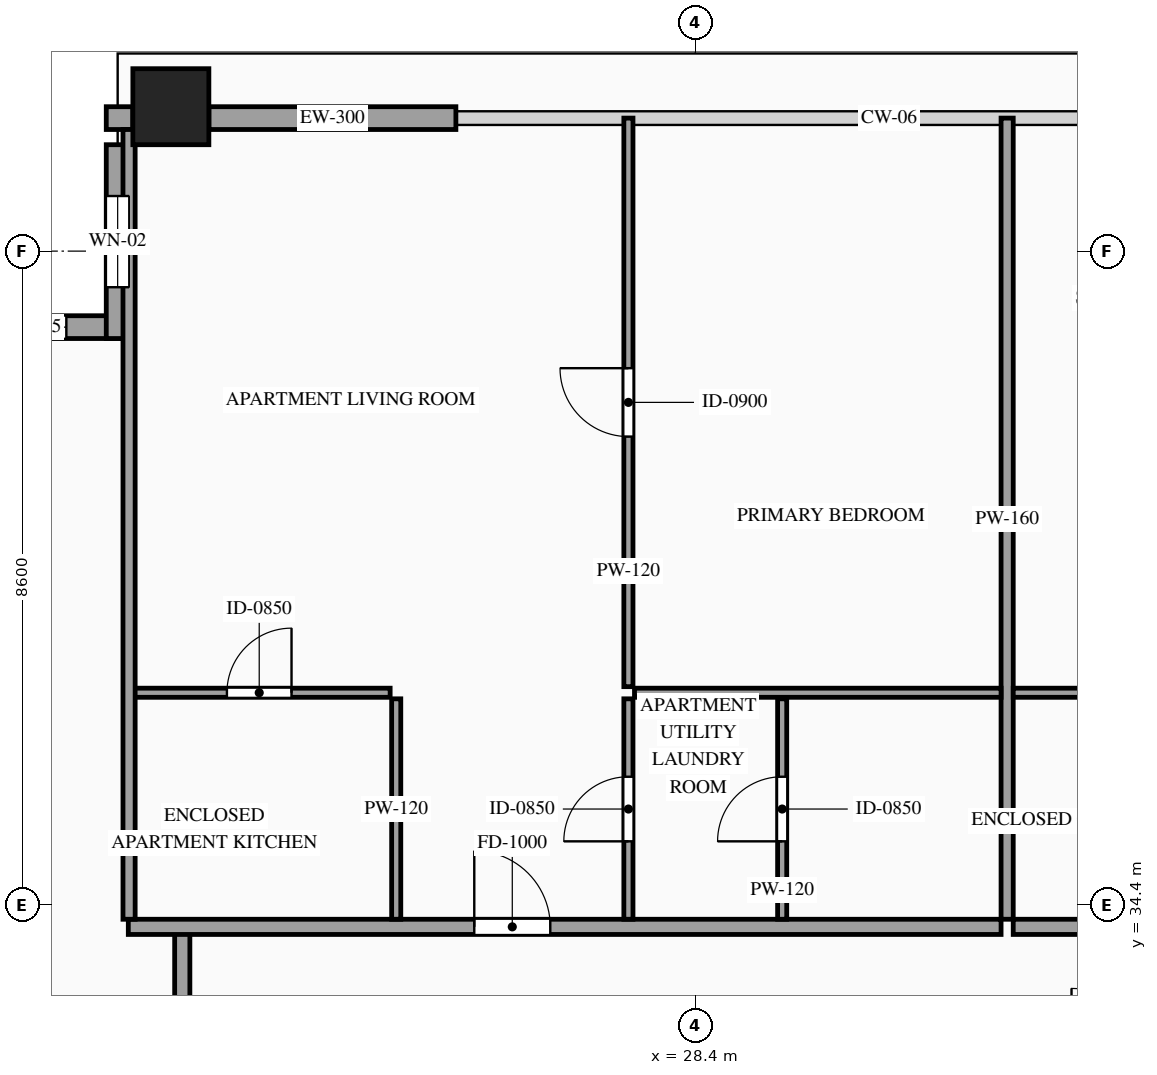
"""IFC4 building model, lengths in metres.
Left out: names, types, materials, properties, quantities, classifications, styles, units other than length and angle.
Written with IfcOpenShell. Run it as: python <this file> out.ifc"""

import sys

from ifc_helpers import new_model, si_unit, direction, frame, frame_2d, origin, origin_2d, place, context, subcontext, project, spatial, rectangle, hollow_rectangle, extrude, source, transform, mapped, element, fill, save


model = new_model("IFC4")
c1 = context("Model", 3, precision=1e-05, world=origin(), true_north=direction((0.0, 1.0)))
c2 = subcontext(c1, "Body", "Model", "MODEL_VIEW")
j1 = project(units=[si_unit("LENGTHUNIT", "METRE"), si_unit("PLANEANGLEUNIT", "RADIAN")], contexts=[c1])
p1 = place(None, origin())
s1 = spatial("IfcSite", under=j1, at=p1, CompositionType="ELEMENT")
p2 = place(p1, origin())
s2 = spatial("IfcBuilding", under=s1, at=p2, CompositionType="ELEMENT")
p3 = place(p2, frame((0.0, 0.0, 343.2)))
s3 = spatial("IfcBuildingStorey", under=s2, at=p3, CompositionType="ELEMENT", Elevation=343.2)
m1 = source(origin(), c2, "Body", "SweptSolid", [
    extrude(hollow_rectangle(XDim=1.0, YDim=1.0, WallThickness=0.048, at=origin_2d()), origin(), (0.0, 0.0, 1.0), 4.0),
])
p4 = place(p3, frame((21.5, 44.9, 0.0), z_axis=(0.0, 0.0, 1.0), x_axis=(1.0, 0.0, 0.0)))
e1 = element("IfcColumn", 1, at=p4, inside=s3, PredefinedType="COLUMN", context=c2, shape_type="MappedRepresentation", body=[
    mapped(m1, transform((0.0, 0.0, 0.0), scale=1.0)),
])
p5 = place(p3, frame((20.95, 42.0, 0.0), z_axis=(0.0, 0.0, 1.0), x_axis=(-1.0, 0.0, 0.0)))
e2 = element("IfcWall", 2, at=p5, inside=s3, PredefinedType="SOLIDWALL", context=c2, shape_type="SweptSolid", body=[
    extrude(rectangle(XDim=2.55, YDim=0.3, at=frame_2d((1.275, 0.0))), origin(), (0.0, 0.0, 1.0), 3.76),
])
p6 = place(p5, frame((0.825, 0.0, 0.85)))
e3 = element("IfcOpeningElement", 3, at=p6, cuts=e2, PredefinedType="OPENING", context=c2, shape_type="SweptSolid", body=[
    extrude(rectangle(XDim=0.9, YDim=1.5, at=frame_2d((0.45, 0.75))), frame((0.0, 0.165, 0.0), z_axis=(0.0, -1.0, 0.0), x_axis=(1.0, 0.0, 0.0)), (0.0, 0.0, 1.0), 0.33),
])
p7 = place(p3, frame((20.8, 44.4, 0.0), z_axis=(0.0, 0.0, 1.0), x_axis=(0.0, -1.0, 0.0)))
e4 = element("IfcWall", 4, at=p7, inside=s3, PredefinedType="SOLIDWALL", context=c2, shape_type="SweptSolid", body=[
    extrude(rectangle(XDim=2.55, YDim=0.3, at=frame_2d((1.275, 0.0))), origin(), (0.0, 0.0, 1.0), 3.76),
])
p8 = place(p7, frame((0.675, 0.0, 0.85)))
e5 = element("IfcOpeningElement", 5, at=p8, cuts=e4, PredefinedType="OPENING", context=c2, shape_type="SweptSolid", body=[
    extrude(rectangle(XDim=1.2, YDim=2.1, at=frame_2d((0.6, 1.05))), frame((0.0, 0.165, 0.0), z_axis=(0.0, -1.0, 0.0), x_axis=(1.0, 0.0, 0.0)), (0.0, 0.0, 1.0), 0.33),
])
m2 = source(origin(), c2, "Body", "SweptSolid", [
    extrude(rectangle(XDim=0.35, YDim=0.3, at=frame_2d((0.175, 0.0))), origin(), (0.0, 0.0, 1.0), 3.76),
])
p9 = place(p3, frame((20.65, 44.75, 0.0), z_axis=(0.0, 0.0, 1.0), x_axis=(1.0, 0.0, 0.0)))
e6 = element("IfcWall", 6, at=p9, inside=s3, PredefinedType="SOLIDWALL", context=c2, shape_type="MappedRepresentation", body=[
    mapped(m2, transform((0.0, 0.0, 0.0), scale=1.0)),
])
m3 = source(origin(), c2, "Body", "SweptSolid", [
    extrude(rectangle(XDim=3.25, YDim=0.3, at=frame_2d((1.625, 0.0))), origin(), (0.0, 0.0, 1.0), 3.365),
])
p10 = place(p3, frame((22.0, 44.75, 0.0), z_axis=(0.0, 0.0, 1.0), x_axis=(1.0, 0.0, 0.0)))
e7 = element("IfcWall", 7, at=p10, inside=s3, PredefinedType="SOLIDWALL", context=c2, shape_type="MappedRepresentation", body=[
    mapped(m3, transform((0.0, 0.0, 0.0), scale=1.0)),
])
m4 = source(origin(), c2, "Body", "SweptSolid", [
    extrude(rectangle(XDim=1.7, YDim=0.2, at=frame_2d((0.85, 0.0))), origin(), (0.0, 0.0, 1.0), 3.76),
])
p11 = place(p3, frame((21.65, 32.35, 0.0), z_axis=(0.0, 0.0, 1.0), x_axis=(0.0, 1.0, 0.0)))
e8 = element("IfcWall", 8, at=p11, inside=s3, PredefinedType="PARTITIONING", context=c2, shape_type="MappedRepresentation", body=[
    mapped(m4, transform((0.0, 0.0, 0.0), scale=1.0)),
])
p12 = place(p3, frame((20.94, 34.11, 0.0), z_axis=(0.0, 0.0, 1.0), x_axis=(1.0, 0.0, 0.0)))
e9 = element("IfcWall", 9, at=p12, inside=s3, PredefinedType="PARTITIONING", context=c2, shape_type="SweptSolid", body=[
    extrude(rectangle(XDim=11.483, YDim=0.2, at=frame_2d((5.742, 0.0))), origin(), (0.0, 0.0, 1.0), 3.76),
])
p13 = place(p12, frame((4.552, 0.0, 0.0)))
e10 = element("IfcOpeningElement", 10, at=p13, cuts=e9, PredefinedType="OPENING", context=c2, shape_type="SweptSolid", body=[
    extrude(rectangle(XDim=1.0, YDim=2.2, at=frame_2d((0.5, 1.1))), frame((0.0, 0.115, 0.0), z_axis=(0.0, -1.0, 0.0), x_axis=(1.0, 0.0, 0.0)), (0.0, 0.0, 1.0), 0.23),
])
m5 = source(origin(), c2, "Body", "SweptSolid", [
    extrude(rectangle(XDim=10.54, YDim=0.16, at=frame_2d((5.27, 0.0))), origin(), (0.0, 0.0, 1.0), 3.76),
])
p14 = place(p3, frame((32.503, 34.21, 0.0), z_axis=(0.0, 0.0, 1.0), x_axis=(0.0, 1.0, 0.0)))
e11 = element("IfcWall", 11, at=p14, inside=s3, PredefinedType="PARTITIONING", context=c2, shape_type="MappedRepresentation", body=[
    mapped(m5, transform((0.0, 0.0, 0.0), scale=1.0)),
])
p15 = place(p3, frame((20.94, 37.19, 0.0), z_axis=(0.0, 0.0, 1.0), x_axis=(1.0, 0.0, 0.0)))
e12 = element("IfcWall", 12, at=p15, inside=s3, PredefinedType="PARTITIONING", context=c2, shape_type="SweptSolid", body=[
    extrude(rectangle(XDim=3.445, YDim=0.12, at=frame_2d((1.723, 0.0))), origin(), (0.0, 0.0, 1.0), 3.76),
])
p16 = place(p15, frame((1.298, 0.0, 0.0)))
e13 = element("IfcOpeningElement", 13, at=p16, cuts=e12, PredefinedType="OPENING", context=c2, shape_type="SweptSolid", body=[
    extrude(rectangle(XDim=0.85, YDim=2.1, at=frame_2d((0.425, 1.05))), frame((0.0, 0.075, 0.0), z_axis=(0.0, -1.0, 0.0), x_axis=(1.0, 0.0, 0.0)), (0.0, 0.0, 1.0), 0.15),
])
m6 = source(origin(), c2, "Body", "SweptSolid", [
    extrude(rectangle(XDim=2.9, YDim=0.12, at=frame_2d((1.45, 0.0))), origin(), (0.0, 0.0, 1.0), 3.76),
])
p17 = place(p3, frame((24.465, 34.21, 0.0), z_axis=(0.0, 0.0, 1.0), x_axis=(0.0, 1.0, 0.0)))
e14 = element("IfcWall", 14, at=p17, inside=s3, PredefinedType="PARTITIONING", context=c2, shape_type="MappedRepresentation", body=[
    mapped(m6, transform((0.0, 0.0, 0.0), scale=1.0)),
])
p18 = place(p3, frame((29.543, 34.21, 0.0), z_axis=(0.0, 0.0, 1.0), x_axis=(0.0, 1.0, 0.0)))
e15 = element("IfcWall", 15, at=p18, inside=s3, PredefinedType="PARTITIONING", context=c2, shape_type="SweptSolid", body=[
    extrude(rectangle(XDim=2.9, YDim=0.12, at=frame_2d((1.45, 0.0))), origin(), (0.0, 0.0, 1.0), 3.76),
])
p19 = place(p18, frame((1.025, 0.0, 0.0)))
e16 = element("IfcOpeningElement", 16, at=p19, cuts=e15, PredefinedType="OPENING", context=c2, shape_type="SweptSolid", body=[
    extrude(rectangle(XDim=0.85, YDim=2.1, at=frame_2d((0.425, 1.05))), frame((0.0, 0.075, 0.0), z_axis=(0.0, -1.0, 0.0), x_axis=(1.0, 0.0, 0.0)), (0.0, 0.0, 1.0), 0.15),
])
m7 = source(origin(), c2, "Body", "SweptSolid", [
    extrude(rectangle(XDim=4.823, YDim=0.12, at=frame_2d((2.412, 0.0))), origin(), (0.0, 0.0, 1.0), 3.76),
])
p20 = place(p3, frame((27.6, 37.19, 0.0), z_axis=(0.0, 0.0, 1.0), x_axis=(1.0, 0.0, 0.0)))
e17 = element("IfcWall", 17, at=p20, inside=s3, PredefinedType="PARTITIONING", context=c2, shape_type="MappedRepresentation", body=[
    mapped(m7, transform((0.0, 0.0, 0.0), scale=1.0)),
])
p21 = place(p3, frame((27.52, 37.27, 0.0), z_axis=(0.0, 0.0, 1.0), x_axis=(0.0, 1.0, 0.0)))
e18 = element("IfcWall", 18, at=p21, inside=s3, PredefinedType="PARTITIONING", context=c2, shape_type="SweptSolid", body=[
    extrude(rectangle(XDim=7.48, YDim=0.12, at=frame_2d((3.74, 0.0))), origin(), (0.0, 0.0, 1.0), 3.76),
])
p22 = place(p21, frame((3.29, 0.0, 0.0)))
e19 = element("IfcOpeningElement", 19, at=p22, cuts=e18, PredefinedType="OPENING", context=c2, shape_type="SweptSolid", body=[
    extrude(rectangle(XDim=0.9, YDim=2.15, at=frame_2d((0.45, 1.075))), frame((0.0, 0.075, 0.0), z_axis=(0.0, -1.0, 0.0), x_axis=(1.0, 0.0, 0.0)), (0.0, 0.0, 1.0), 0.15),
])
p23 = place(p3, frame((27.52, 34.21, 0.0), z_axis=(0.0, 0.0, 1.0), x_axis=(0.0, 1.0, 0.0)))
e20 = element("IfcWall", 20, at=p23, inside=s3, PredefinedType="PARTITIONING", context=c2, shape_type="SweptSolid", body=[
    extrude(rectangle(XDim=2.9, YDim=0.12, at=frame_2d((1.45, 0.0))), origin(), (0.0, 0.0, 1.0), 3.76),
])
p24 = place(p23, frame((1.025, 0.0, 0.0)))
e21 = element("IfcOpeningElement", 21, at=p24, cuts=e20, PredefinedType="OPENING", context=c2, shape_type="SweptSolid", body=[
    extrude(rectangle(XDim=0.85, YDim=2.1, at=frame_2d((0.425, 1.05))), frame((0.0, 0.075, 0.0), z_axis=(0.0, -1.0, 0.0), x_axis=(1.0, 0.0, 0.0)), (0.0, 0.0, 1.0), 0.15),
])
p25 = place(p3, frame((32.583, 34.11, 0.0), z_axis=(0.0, 0.0, 1.0), x_axis=(1.0, 0.0, 0.0)))
e22 = element("IfcWall", 22, at=p25, inside=s3, PredefinedType="PARTITIONING", context=c2, shape_type="SweptSolid", body=[
    extrude(rectangle(XDim=20.477, YDim=0.2, at=frame_2d((10.239, 0.0))), origin(), (0.0, 0.0, 1.0), 3.76),
])
p26 = place(p25, frame((11.557, 0.0, 0.0)))
e23 = element("IfcOpeningElement", 23, at=p26, cuts=e22, PredefinedType="OPENING", context=c2, shape_type="SweptSolid", body=[
    extrude(rectangle(XDim=1.0, YDim=2.2, at=frame_2d((0.5, 1.1))), frame((0.0, 0.115, 0.0), z_axis=(0.0, -1.0, 0.0), x_axis=(1.0, 0.0, 0.0)), (0.0, 0.0, 1.0), 0.23),
])
m8 = source(origin(), c2, "Body", "SweptSolid", [
    extrude(rectangle(XDim=10.39, YDim=0.16, at=frame_2d((5.195, 0.0))), origin(), (0.0, 0.0, 1.0), 3.76),
])
p27 = place(p3, frame((20.95, 34.21, 0.0), z_axis=(0.0, 0.0, 1.0), x_axis=(0.0, 1.0, 0.0)))
e24 = element("IfcWall", 24, at=p27, inside=s3, PredefinedType="PARTITIONING", context=c2, shape_type="MappedRepresentation", body=[
    mapped(m8, transform((0.0, 0.0, 0.0), scale=1.0)),
])
p28 = place(p3, frame((32.583, 37.19, 0.0), z_axis=(0.0, 0.0, 1.0), x_axis=(1.0, 0.0, 0.0)))
e25 = element("IfcWall", 25, at=p28, inside=s3, PredefinedType="PARTITIONING", context=c2, shape_type="SweptSolid", body=[
    extrude(rectangle(XDim=4.83, YDim=0.12, at=frame_2d((2.415, 0.0))), origin(), (0.0, 0.0, 1.0), 3.76),
])
p29 = place(p28, frame((1.99, 0.0, 0.0)))
e26 = element("IfcOpeningElement", 26, at=p29, cuts=e25, PredefinedType="OPENING", context=c2, shape_type="SweptSolid", body=[
    extrude(rectangle(XDim=0.85, YDim=2.1, at=frame_2d((0.425, 1.05))), frame((0.0, 0.075, 0.0), z_axis=(0.0, -1.0, 0.0), x_axis=(1.0, 0.0, 0.0)), (0.0, 0.0, 1.0), 0.15),
])
m9 = source(origin(), c2, "Body", "SweptSolid", [
    extrude(rectangle(XDim=0.9, YDim=1.5, at=frame_2d((0.45, 0.75))), frame((0.0, 0.03, 0.0), z_axis=(0.0, -1.0, 0.0), x_axis=(1.0, 0.0, 0.0)), (0.0, 0.0, 1.0), 0.06),
])
p30 = place(p6, origin())
e27 = element("IfcWindow", 27, at=p30, inside=s3, PartitioningType="SINGLE_PANEL", PredefinedType="WINDOW", context=c2, shape_type="MappedRepresentation", body=[
    mapped(m9, transform((0.0, 0.0, 0.0), scale=1.0)),
])
fill(e3, e27)
m10 = source(origin(), c2, "Body", "SweptSolid", [
    extrude(rectangle(XDim=1.2, YDim=2.1, at=frame_2d((0.6, 1.05))), frame((0.0, 0.03, 0.0), z_axis=(0.0, -1.0, 0.0), x_axis=(1.0, 0.0, 0.0)), (0.0, 0.0, 1.0), 0.06),
])
p31 = place(p8, origin())
e28 = element("IfcWindow", 28, at=p31, inside=s3, PartitioningType="SINGLE_PANEL", PredefinedType="WINDOW", context=c2, shape_type="MappedRepresentation", body=[
    mapped(m10, transform((0.0, 0.0, 0.0), scale=1.0)),
])
fill(e5, e28)
m11 = source(origin(), c2, "Body", "SweptSolid", [
    extrude(rectangle(XDim=1.0, YDim=2.2, at=frame_2d((0.5, 1.1))), frame((0.0, 0.025, 0.0), z_axis=(0.0, -1.0, 0.0), x_axis=(1.0, 0.0, 0.0)), (0.0, 0.0, 1.0), 0.05),
])
p32 = place(p13, origin())
e29 = element("IfcDoor", 29, at=p32, inside=s3, OperationType="SINGLE_SWING_LEFT", PredefinedType="DOOR", context=c2, shape_type="MappedRepresentation", body=[
    mapped(m11, transform((0.0, 0.0, 0.0), scale=1.0)),
])
fill(e10, e29)
m12 = source(origin(), c2, "Body", "SweptSolid", [
    extrude(rectangle(XDim=0.85, YDim=2.1, at=frame_2d((0.425, 1.05))), frame((0.0, 0.025, 0.0), z_axis=(0.0, -1.0, 0.0), x_axis=(1.0, 0.0, 0.0)), (0.0, 0.0, 1.0), 0.05),
])
p33 = place(p16, origin())
e30 = element("IfcDoor", 30, at=p33, inside=s3, OperationType="SINGLE_SWING_RIGHT", PredefinedType="DOOR", context=c2, shape_type="MappedRepresentation", body=[
    mapped(m12, transform((0.0, 0.0, 0.0), scale=1.0)),
])
fill(e13, e30)
p34 = place(p19, origin())
e31 = element("IfcDoor", 31, at=p34, inside=s3, OperationType="SINGLE_SWING_LEFT", PredefinedType="DOOR", context=c2, shape_type="MappedRepresentation", body=[
    mapped(m12, transform((0.0, 0.0, 0.0), scale=1.0)),
])
fill(e16, e31)
m13 = source(origin(), c2, "Body", "SweptSolid", [
    extrude(rectangle(XDim=0.9, YDim=2.15, at=frame_2d((0.45, 1.075))), frame((0.0, 0.025, 0.0), z_axis=(0.0, -1.0, 0.0), x_axis=(1.0, 0.0, 0.0)), (0.0, 0.0, 1.0), 0.05),
])
p35 = place(p22, origin())
e32 = element("IfcDoor", 32, at=p35, inside=s3, OperationType="SINGLE_SWING_RIGHT", PredefinedType="DOOR", context=c2, shape_type="MappedRepresentation", body=[
    mapped(m13, transform((0.0, 0.0, 0.0), scale=1.0)),
])
fill(e19, e32)
p36 = place(p24, origin())
e33 = element("IfcDoor", 33, at=p36, inside=s3, OperationType="SINGLE_SWING_LEFT", PredefinedType="DOOR", context=c2, shape_type="MappedRepresentation", body=[
    mapped(m12, transform((0.0, 0.0, 0.0), scale=1.0)),
])
fill(e21, e33)
save(model, sys.argv[1])
